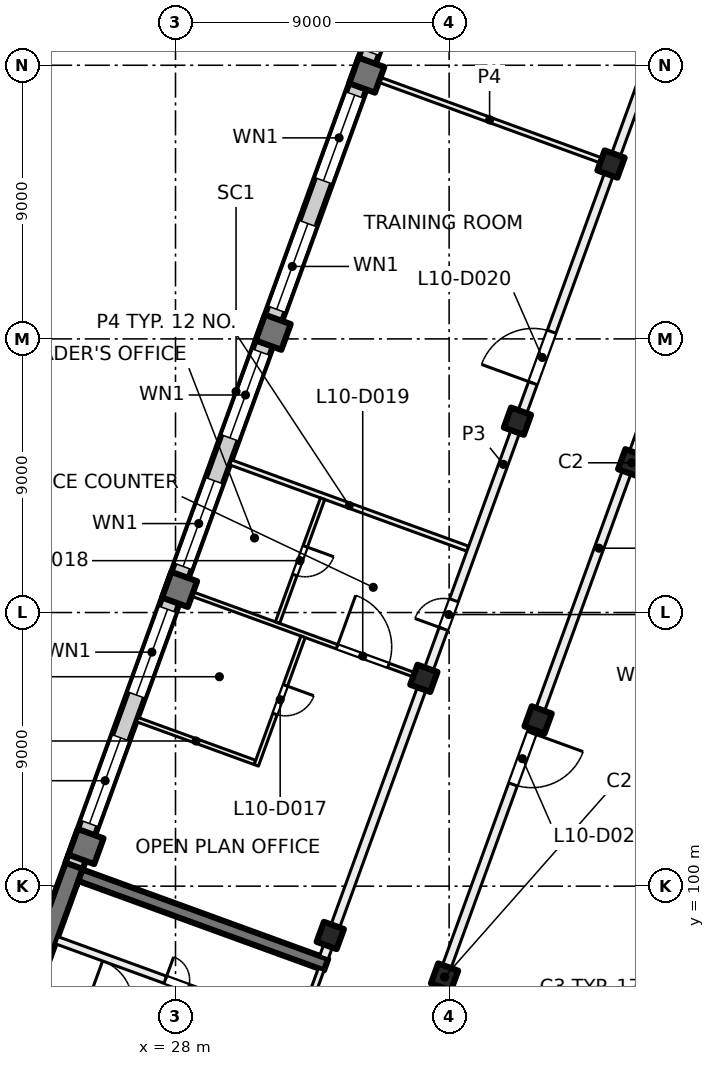
"""IFC4 building model, lengths in metres.
Left out: names, types, materials, properties, quantities, classifications, styles, units other than length and angle.
Written with IfcOpenShell. Run it as: python <this file> out.ifc"""

import sys

from ifc_helpers import new_model, si_unit, direction, frame, frame_2d, origin, origin_2d, place, context, subcontext, project, spatial, rectangle, extrude, element, fill, save


model = new_model("IFC4")
c1 = context("Model", 3, precision=1e-05, world=origin(), true_north=direction((0.0, 1.0)))
c2 = subcontext(c1, "Body", "Model", "MODEL_VIEW")
j1 = project(units=[si_unit("LENGTHUNIT", "METRE"), si_unit("PLANEANGLEUNIT", "RADIAN")], contexts=[c1])
p1 = place(None, origin())
s1 = spatial("IfcSite", under=j1, at=p1, CompositionType="ELEMENT")
p2 = place(p1, origin())
s2 = spatial("IfcBuilding", under=s1, at=p2, CompositionType="ELEMENT")
p3 = place(p2, frame((0.0, 0.0, 47.5)))
s3 = spatial("IfcBuildingStorey", under=s2, at=p3, CompositionType="ELEMENT", Elevation=47.5)
for number, where, z_axis, x_axis in (
    (1, (43.006, 113.925, 0.0), (0.0, 0.0, 1.0), (-0.342, -0.94, 0.0)),
    (2, (39.927, 105.468, 0.0), (0.0, 0.0, 1.0), (-0.342, -0.94, 0.0)),
    (3, (36.849, 97.011, 0.0), (0.0, 0.0, 1.0), (-0.342, -0.94, 0.0)),
    (4, (42.325, 123.751, 0.0), (0.0, 0.0, 1.0), (-0.342, -0.94, 0.0)),
    (5, (39.247, 115.293, 0.0), (0.0, 0.0, 1.0), (-0.342, -0.94, 0.0)),
    (6, (36.169, 106.836, 0.0), (0.0, 0.0, 1.0), (-0.342, -0.94, 0.0)),
    (7, (33.091, 98.379, 0.0), (0.0, 0.0, 1.0), (-0.342, -0.94, 0.0)),
):
    element("IfcColumn", number, at=place(p3, frame(where, z_axis=z_axis, x_axis=x_axis)), inside=s3, PredefinedType="COLUMN", context=c2, shape_type="SweptSolid", body=[
        extrude(rectangle(XDim=0.7, YDim=0.7, at=origin_2d()), origin(), (0.0, 0.0, 1.0), 4.0),
    ])
for number, where, z_axis, x_axis in (
    (8, (34.291, 126.675, 0.0), (0.0, 0.0, 1.0), (-0.342, -0.94, 0.0)),
    (9, (31.212, 118.218, 0.0), (0.0, 0.0, 1.0), (-0.342, -0.94, 0.0)),
    (10, (28.134, 109.76, 0.0), (0.0, 0.0, 1.0), (-0.342, -0.94, 0.0)),
    (11, (25.056, 101.303, 0.0), (0.0, 0.0, 1.0), (-0.342, -0.94, 0.0)),
):
    element("IfcColumn", number, at=place(p3, frame(where, z_axis=z_axis, x_axis=x_axis)), inside=s3, PredefinedType="COLUMN", context=c2, shape_type="SweptSolid", body=[
        extrude(rectangle(XDim=0.9, YDim=0.9, at=origin_2d()), origin(), (0.0, 0.0, 1.0), 4.0),
    ])
p4 = place(p3, frame((21.717, 92.568, 0.0), z_axis=(0.0, 0.0, 1.0), x_axis=(0.342016162452, 0.939694069696, 0.0)))
e12 = element("IfcWall", 12, at=p4, inside=s3, PredefinedType="SHEAR", context=c2, shape_type="SweptSolid", body=[
    extrude(rectangle(XDim=8.9, YDim=0.6, at=frame_2d((4.45, 0.0))), origin(), (0.0, 0.0, 1.0), 4.0),
])
p5 = place(p3, frame((32.953, 97.418, 0.0), z_axis=(0.0, 0.0, 1.0), x_axis=(-0.93969060187, 0.342025690201, 0.0)))
e13 = element("IfcWall", 13, at=p5, inside=s3, PredefinedType="SHEAR", context=c2, shape_type="SweptSolid", body=[
    extrude(rectangle(XDim=8.6, YDim=0.4, at=frame_2d((4.3, 0.0))), origin(), (0.0, 0.0, 1.0), 4.0),
])
p6 = place(p3, frame((24.666, 100.669, 0.0), z_axis=(0.0, 0.0, 1.0), x_axis=(0.34201964167, 0.939692803373, 0.0)))
e14 = element("IfcWall", 14, at=p6, inside=s3, PredefinedType="SOLIDWALL", context=c2, shape_type="SweptSolid", body=[
    extrude(rectangle(XDim=32.884, YDim=0.6, at=frame_2d((16.442, 0.0))), origin(), (0.0, 0.0, 1.0), 3.625),
])
p7 = place(p6, frame((1.48, 0.0, 0.9)))
e15 = element("IfcOpeningElement", 15, at=p7, cuts=e14, PredefinedType="OPENING", context=c2, shape_type="SweptSolid", body=[
    extrude(rectangle(XDim=3.0, YDim=2.4, at=frame_2d((1.5, 1.2))), frame((0.0, 0.31, 0.0), z_axis=(0.0, -1.0, 0.0), x_axis=(1.0, 0.0, 0.0)), (0.0, 0.0, 1.0), 0.62),
])
p8 = place(p6, frame((5.98, 0.0, 0.9)))
e16 = element("IfcOpeningElement", 16, at=p8, cuts=e14, PredefinedType="OPENING", context=c2, shape_type="SweptSolid", body=[
    extrude(rectangle(XDim=3.0, YDim=2.4, at=frame_2d((1.5, 1.2))), frame((0.0, 0.31, 0.0), z_axis=(0.0, -1.0, 0.0), x_axis=(1.0, 0.0, 0.0)), (0.0, 0.0, 1.0), 0.62),
])
p9 = place(p6, frame((10.48, 0.0, 0.9)))
e17 = element("IfcOpeningElement", 17, at=p9, cuts=e14, PredefinedType="OPENING", context=c2, shape_type="SweptSolid", body=[
    extrude(rectangle(XDim=3.0, YDim=2.4, at=frame_2d((1.5, 1.2))), frame((0.0, 0.31, 0.0), z_axis=(0.0, -1.0, 0.0), x_axis=(1.0, 0.0, 0.0)), (0.0, 0.0, 1.0), 0.62),
])
p10 = place(p6, frame((14.98, 0.0, 0.9)))
e18 = element("IfcOpeningElement", 18, at=p10, cuts=e14, PredefinedType="OPENING", context=c2, shape_type="SweptSolid", body=[
    extrude(rectangle(XDim=3.0, YDim=2.4, at=frame_2d((1.5, 1.2))), frame((0.0, 0.31, 0.0), z_axis=(0.0, -1.0, 0.0), x_axis=(1.0, 0.0, 0.0)), (0.0, 0.0, 1.0), 0.62),
])
p11 = place(p6, frame((19.48, 0.0, 0.9)))
e19 = element("IfcOpeningElement", 19, at=p11, cuts=e14, PredefinedType="OPENING", context=c2, shape_type="SweptSolid", body=[
    extrude(rectangle(XDim=3.0, YDim=2.4, at=frame_2d((1.5, 1.2))), frame((0.0, 0.31, 0.0), z_axis=(0.0, -1.0, 0.0), x_axis=(1.0, 0.0, 0.0)), (0.0, 0.0, 1.0), 0.62),
])
p12 = place(p6, frame((23.98, 0.0, 0.9)))
e20 = element("IfcOpeningElement", 20, at=p12, cuts=e14, PredefinedType="OPENING", context=c2, shape_type="SweptSolid", body=[
    extrude(rectangle(XDim=3.0, YDim=2.4, at=frame_2d((1.5, 1.2))), frame((0.0, 0.31, 0.0), z_axis=(0.0, -1.0, 0.0), x_axis=(1.0, 0.0, 0.0)), (0.0, 0.0, 1.0), 0.62),
])
p13 = place(p6, frame((28.48, 0.0, 0.9)))
e21 = element("IfcOpeningElement", 21, at=p13, cuts=e14, PredefinedType="OPENING", context=c2, shape_type="SweptSolid", body=[
    extrude(rectangle(XDim=3.0, YDim=2.4, at=frame_2d((1.5, 1.2))), frame((0.0, 0.31, 0.0), z_axis=(0.0, -1.0, 0.0), x_axis=(1.0, 0.0, 0.0)), (0.0, 0.0, 1.0), 0.62),
])
p14 = place(p3, frame((31.491, 93.693, 0.0), z_axis=(0.0, 0.0, 1.0), x_axis=(0.341995824804, 0.939701471648, 0.0)))
e22 = element("IfcWall", 22, at=p14, inside=s3, PredefinedType="PARTITIONING", context=c2, shape_type="SweptSolid", body=[
    extrude(rectangle(XDim=3.8, YDim=0.2, at=frame_2d((1.9, 0.0))), origin(), (0.0, 0.0, 1.0), 3.625),
])
p15 = place(p14, frame((0.3, 0.0, 0.0)))
e23 = element("IfcOpeningElement", 23, at=p15, cuts=e22, PredefinedType="OPENING", context=c2, shape_type="SweptSolid", body=[
    extrude(rectangle(XDim=1.2, YDim=2.1, at=frame_2d((0.6, 1.05))), frame((0.0, 0.11, 0.0), z_axis=(0.0, -1.0, 0.0), x_axis=(1.0, 0.0, 0.0)), (0.0, 0.0, 1.0), 0.22),
])
p16 = place(p3, frame((23.538, 96.694, 0.0), z_axis=(0.0, 0.0, 1.0), x_axis=(0.939691552312, -0.342023078919, 0.0)))
e24 = element("IfcWall", 24, at=p16, inside=s3, PredefinedType="PARTITIONING", context=c2, shape_type="SweptSolid", body=[
    extrude(rectangle(XDim=8.4, YDim=0.2, at=frame_2d((4.2, 0.0))), origin(), (0.0, 0.0, 1.0), 3.625),
])
p17 = place(p16, frame((1.65, 0.0, 0.0)))
e25 = element("IfcOpeningElement", 25, at=p17, cuts=e24, PredefinedType="OPENING", context=c2, shape_type="SweptSolid", body=[
    extrude(rectangle(XDim=1.5, YDim=2.1, at=frame_2d((0.75, 1.05))), frame((0.0, 0.11, 0.0), z_axis=(0.0, -1.0, 0.0), x_axis=(1.0, 0.0, 0.0)), (0.0, 0.0, 1.0), 0.22),
])
p18 = place(p3, frame((24.094, 98.221, 0.0), z_axis=(0.0, 0.0, 1.0), x_axis=(0.939691552312, -0.342023078919, 0.0)))
e26 = element("IfcWall", 26, at=p18, inside=s3, PredefinedType="PARTITIONING", context=c2, shape_type="SweptSolid", body=[
    extrude(rectangle(XDim=8.4, YDim=0.25, at=frame_2d((4.2, 0.0))), origin(), (0.0, 0.0, 1.0), 3.625),
])
p19 = place(p18, frame((3.8, 0.0, 0.0)))
e27 = element("IfcOpeningElement", 27, at=p19, cuts=e26, PredefinedType="OPENING", context=c2, shape_type="SweptSolid", body=[
    extrude(rectangle(XDim=0.8, YDim=2.1, at=frame_2d((0.4, 1.05))), frame((0.0, 0.135, 0.0), z_axis=(0.0, -1.0, 0.0), x_axis=(1.0, 0.0, 0.0)), (0.0, 0.0, 1.0), 0.27),
])
p20 = place(p3, frame((26.736, 105.48, 0.0), z_axis=(0.0, 0.0, 1.0), x_axis=(0.939784783713, -0.341766821533, 0.0)))
e28 = element("IfcWall", 28, at=p20, inside=s3, PredefinedType="PARTITIONING", context=c2, shape_type="SweptSolid", body=[
    extrude(rectangle(XDim=4.125, YDim=0.15, at=frame_2d((2.062, 0.0))), origin(), (0.0, 0.0, 1.0), 3.625),
])
p21 = place(p3, frame((28.275, 109.709, 0.0), z_axis=(0.0, 0.0, 1.0), x_axis=(0.939697205528, -0.342007546586, 0.0)))
e29 = element("IfcWall", 29, at=p21, inside=s3, PredefinedType="PARTITIONING", context=c2, shape_type="SweptSolid", body=[
    extrude(rectangle(XDim=8.301, YDim=0.15, at=frame_2d((4.15, 0.0))), origin(), (0.0, 0.0, 1.0), 3.625),
])
p22 = place(p21, frame((5.361, 0.0, 0.0)))
e30 = element("IfcOpeningElement", 30, at=p22, cuts=e29, PredefinedType="OPENING", context=c2, shape_type="SweptSolid", body=[
    extrude(rectangle(XDim=1.8, YDim=2.1, at=frame_2d((0.9, 1.05))), frame((0.0, 0.085, 0.0), z_axis=(0.0, -1.0, 0.0), x_axis=(1.0, 0.0, 0.0)), (0.0, 0.0, 1.0), 0.17),
])
p23 = place(p3, frame((29.814, 113.938, 0.0), z_axis=(0.0, 0.0, 1.0), x_axis=(0.939697205528, -0.342007546586, 0.0)))
e31 = element("IfcWall", 31, at=p23, inside=s3, PredefinedType="PARTITIONING", context=c2, shape_type="SweptSolid", body=[
    extrude(rectangle(XDim=8.301, YDim=0.175, at=frame_2d((4.15, 0.0))), origin(), (0.0, 0.0, 1.0), 3.625),
])
p24 = place(p3, frame((32.196, 108.203, 0.0), z_axis=(0.0, 0.0, 1.0), x_axis=(-0.34200440972, -0.939698347201, 0.0)))
e32 = element("IfcWall", 32, at=p24, inside=s3, PredefinedType="PARTITIONING", context=c2, shape_type="SweptSolid", body=[
    extrude(rectangle(XDim=4.5, YDim=0.15, at=frame_2d((2.25, 0.0))), origin(), (0.0, 0.0, 1.0), 3.625),
])
p25 = place(p24, frame((1.703, 0.0, 0.0)))
e33 = element("IfcOpeningElement", 33, at=p25, cuts=e32, PredefinedType="OPENING", context=c2, shape_type="SweptSolid", body=[
    extrude(rectangle(XDim=1.0, YDim=2.1, at=frame_2d((0.5, 1.05))), frame((0.0, 0.085, 0.0), z_axis=(0.0, -1.0, 0.0), x_axis=(1.0, 0.0, 0.0)), (0.0, 0.0, 1.0), 0.17),
])
p26 = place(p3, frame((32.838, 112.744, 0.0), z_axis=(0.0, 0.0, 1.0), x_axis=(-0.341896722183, -0.93973753323, 0.0)))
e34 = element("IfcWall", 34, at=p26, inside=s3, PredefinedType="PARTITIONING", context=c2, shape_type="SweptSolid", body=[
    extrude(rectangle(XDim=4.337, YDim=0.15, at=frame_2d((2.169, 0.0))), origin(), (0.0, 0.0, 1.0), 3.625),
])
p27 = place(p26, frame((1.669, 0.0, 0.0)))
e35 = element("IfcOpeningElement", 35, at=p27, cuts=e34, PredefinedType="OPENING", context=c2, shape_type="SweptSolid", body=[
    extrude(rectangle(XDim=1.0, YDim=2.1, at=frame_2d((0.5, 1.05))), frame((0.0, 0.085, 0.0), z_axis=(0.0, -1.0, 0.0), x_axis=(1.0, 0.0, 0.0)), (0.0, 0.0, 1.0), 0.17),
])
p28 = place(p3, frame((32.881, 97.657, 0.0), z_axis=(0.0, 0.0, 1.0), x_axis=(0.342017360004, 0.939693633828, 0.0)))
e36 = element("IfcWall", 36, at=p28, inside=s3, PredefinedType="PARTITIONING", context=c2, shape_type="SweptSolid", body=[
    extrude(rectangle(XDim=34.516, YDim=0.3, at=frame_2d((17.258, 0.0))), origin(), (0.0, 0.0, 1.0), 3.625),
])
p29 = place(p28, frame((11.5, 0.0, 0.0)))
e37 = element("IfcOpeningElement", 37, at=p29, cuts=e36, PredefinedType="OPENING", context=c2, shape_type="SweptSolid", body=[
    extrude(rectangle(XDim=1.0, YDim=2.1, at=frame_2d((0.5, 1.05))), frame((0.0, 0.16, 0.0), z_axis=(0.0, -1.0, 0.0), x_axis=(1.0, 0.0, 0.0)), (0.0, 0.0, 1.0), 0.32),
])
p30 = place(p28, frame((20.1, 0.0, 0.0)))
e38 = element("IfcOpeningElement", 38, at=p30, cuts=e36, PredefinedType="OPENING", context=c2, shape_type="SweptSolid", body=[
    extrude(rectangle(XDim=1.8, YDim=2.1, at=frame_2d((0.9, 1.05))), frame((0.0, 0.16, 0.0), z_axis=(0.0, -1.0, 0.0), x_axis=(1.0, 0.0, 0.0)), (0.0, 0.0, 1.0), 0.32),
])
p31 = place(p3, frame((42.231, 123.785, 0.0), z_axis=(0.0, 0.0, 1.0), x_axis=(-0.939687752599, 0.342033518263, 0.0)))
e39 = element("IfcWall", 39, at=p31, inside=s3, PredefinedType="PARTITIONING", context=c2, shape_type="SweptSolid", body=[
    extrude(rectangle(XDim=8.301, YDim=0.175, at=frame_2d((4.15, 0.0))), origin(), (0.0, 0.0, 1.0), 3.625),
])
p32 = place(p3, frame((43.1, 113.891, 0.0), z_axis=(0.0, 0.0, 1.0), x_axis=(0.939670544866, -0.342080790328, 0.0)))
e40 = element("IfcWall", 40, at=p32, inside=s3, PredefinedType="PARTITIONING", context=c2, shape_type="SweptSolid", body=[
    extrude(rectangle(XDim=8.3, YDim=0.15, at=frame_2d((4.15, 0.0))), origin(), (0.0, 0.0, 1.0), 3.625),
])
p33 = place(p3, frame((47.314, 125.909, 0.0), z_axis=(0.0, 0.0, 1.0), x_axis=(-0.342010770371, -0.939696032209, 0.0)))
e41 = element("IfcWall", 41, at=p33, inside=s3, PredefinedType="PARTITIONING", context=c2, shape_type="SweptSolid", body=[
    extrude(rectangle(XDim=31.485, YDim=0.3, at=frame_2d((15.742, 0.0))), origin(), (0.0, 0.0, 1.0), 3.625),
])
p34 = place(p33, frame((22.21, 0.0, 0.0)))
e42 = element("IfcOpeningElement", 42, at=p34, cuts=e41, PredefinedType="OPENING", context=c2, shape_type="SweptSolid", body=[
    extrude(rectangle(XDim=1.8, YDim=2.1, at=frame_2d((0.9, 1.05))), frame((0.0, 0.16, 0.0), z_axis=(0.0, -1.0, 0.0), x_axis=(1.0, 0.0, 0.0)), (0.0, 0.0, 1.0), 0.32),
])
p35 = place(p33, frame((9.985, 0.0, 0.0)))
e43 = element("IfcOpeningElement", 43, at=p35, cuts=e41, PredefinedType="OPENING", context=c2, shape_type="SweptSolid", body=[
    extrude(rectangle(XDim=1.0, YDim=2.1, at=frame_2d((0.5, 1.05))), frame((0.0, 0.16, 0.0), z_axis=(0.0, -1.0, 0.0), x_axis=(1.0, 0.0, 0.0)), (0.0, 0.0, 1.0), 0.32),
])
p36 = place(p33, frame((5.484, 0.0, 0.0)))
e44 = element("IfcOpeningElement", 44, at=p36, cuts=e41, PredefinedType="OPENING", context=c2, shape_type="SweptSolid", body=[
    extrude(rectangle(XDim=1.0, YDim=2.1, at=frame_2d((0.5, 1.05))), frame((0.0, 0.16, 0.0), z_axis=(0.0, -1.0, 0.0), x_axis=(1.0, 0.0, 0.0)), (0.0, 0.0, 1.0), 0.32),
])
p37 = place(p7, origin())
e45 = element("IfcWindow", 45, at=p37, inside=s3, PartitioningType="SINGLE_PANEL", PredefinedType="WINDOW", context=c2, shape_type="SweptSolid", body=[
    extrude(rectangle(XDim=3.0, YDim=2.4, at=frame_2d((1.5, 1.2))), frame((0.0, 0.03, 0.0), z_axis=(0.0, -1.0, 0.0), x_axis=(1.0, 0.0, 0.0)), (0.0, 0.0, 1.0), 0.06),
])
fill(e15, e45)
p38 = place(p8, origin())
e46 = element("IfcWindow", 46, at=p38, inside=s3, PartitioningType="SINGLE_PANEL", PredefinedType="WINDOW", context=c2, shape_type="SweptSolid", body=[
    extrude(rectangle(XDim=3.0, YDim=2.4, at=frame_2d((1.5, 1.2))), frame((0.0, 0.03, 0.0), z_axis=(0.0, -1.0, 0.0), x_axis=(1.0, 0.0, 0.0)), (0.0, 0.0, 1.0), 0.06),
])
fill(e16, e46)
p39 = place(p9, origin())
e47 = element("IfcWindow", 47, at=p39, inside=s3, PartitioningType="SINGLE_PANEL", PredefinedType="WINDOW", context=c2, shape_type="SweptSolid", body=[
    extrude(rectangle(XDim=3.0, YDim=2.4, at=frame_2d((1.5, 1.2))), frame((0.0, 0.03, 0.0), z_axis=(0.0, -1.0, 0.0), x_axis=(1.0, 0.0, 0.0)), (0.0, 0.0, 1.0), 0.06),
])
fill(e17, e47)
p40 = place(p10, origin())
e48 = element("IfcWindow", 48, at=p40, inside=s3, PartitioningType="SINGLE_PANEL", PredefinedType="WINDOW", context=c2, shape_type="SweptSolid", body=[
    extrude(rectangle(XDim=3.0, YDim=2.4, at=frame_2d((1.5, 1.2))), frame((0.0, 0.03, 0.0), z_axis=(0.0, -1.0, 0.0), x_axis=(1.0, 0.0, 0.0)), (0.0, 0.0, 1.0), 0.06),
])
fill(e18, e48)
p41 = place(p11, origin())
e49 = element("IfcWindow", 49, at=p41, inside=s3, PartitioningType="SINGLE_PANEL", PredefinedType="WINDOW", context=c2, shape_type="SweptSolid", body=[
    extrude(rectangle(XDim=3.0, YDim=2.4, at=frame_2d((1.5, 1.2))), frame((0.0, 0.03, 0.0), z_axis=(0.0, -1.0, 0.0), x_axis=(1.0, 0.0, 0.0)), (0.0, 0.0, 1.0), 0.06),
])
fill(e19, e49)
p42 = place(p12, origin())
e50 = element("IfcWindow", 50, at=p42, inside=s3, PartitioningType="SINGLE_PANEL", PredefinedType="WINDOW", context=c2, shape_type="SweptSolid", body=[
    extrude(rectangle(XDim=3.0, YDim=2.4, at=frame_2d((1.5, 1.2))), frame((0.0, 0.03, 0.0), z_axis=(0.0, -1.0, 0.0), x_axis=(1.0, 0.0, 0.0)), (0.0, 0.0, 1.0), 0.06),
])
fill(e20, e50)
p43 = place(p13, origin())
e51 = element("IfcWindow", 51, at=p43, inside=s3, PartitioningType="SINGLE_PANEL", PredefinedType="WINDOW", context=c2, shape_type="SweptSolid", body=[
    extrude(rectangle(XDim=3.0, YDim=2.4, at=frame_2d((1.5, 1.2))), frame((0.0, 0.03, 0.0), z_axis=(0.0, -1.0, 0.0), x_axis=(1.0, 0.0, 0.0)), (0.0, 0.0, 1.0), 0.06),
])
fill(e21, e51)
p44 = place(p19, origin())
e52 = element("IfcDoor", 52, at=p44, inside=s3, OperationType="SINGLE_SWING_LEFT", PredefinedType="DOOR", context=c2, shape_type="SweptSolid", body=[
    extrude(rectangle(XDim=0.8, YDim=2.1, at=frame_2d((0.4, 1.05))), frame((0.0, 0.025, 0.0), z_axis=(0.0, -1.0, 0.0), x_axis=(1.0, 0.0, 0.0)), (0.0, 0.0, 1.0), 0.05),
])
fill(e27, e52)
p45 = place(p29, origin())
e53 = element("IfcDoor", 53, at=p45, inside=s3, OperationType="SINGLE_SWING_LEFT", PredefinedType="DOOR", context=c2, shape_type="SweptSolid", body=[
    extrude(rectangle(XDim=1.0, YDim=2.1, at=frame_2d((0.5, 1.05))), frame((0.0, 0.025, 0.0), z_axis=(0.0, -1.0, 0.0), x_axis=(1.0, 0.0, 0.0)), (0.0, 0.0, 1.0), 0.05),
])
fill(e37, e53)
p46 = place(p25, origin())
e54 = element("IfcDoor", 54, at=p46, inside=s3, OperationType="SINGLE_SWING_LEFT", PredefinedType="DOOR", context=c2, shape_type="SweptSolid", body=[
    extrude(rectangle(XDim=1.0, YDim=2.1, at=frame_2d((0.5, 1.05))), frame((0.0, 0.025, 0.0), z_axis=(0.0, -1.0, 0.0), x_axis=(1.0, 0.0, 0.0)), (0.0, 0.0, 1.0), 0.05),
])
fill(e33, e54)
p47 = place(p27, origin())
e55 = element("IfcDoor", 55, at=p47, inside=s3, OperationType="SINGLE_SWING_LEFT", PredefinedType="DOOR", context=c2, shape_type="SweptSolid", body=[
    extrude(rectangle(XDim=1.0, YDim=2.1, at=frame_2d((0.5, 1.05))), frame((0.0, 0.025, 0.0), z_axis=(0.0, -1.0, 0.0), x_axis=(1.0, 0.0, 0.0)), (0.0, 0.0, 1.0), 0.05),
])
fill(e35, e55)
p48 = place(p22, origin())
e56 = element("IfcDoor", 56, at=p48, inside=s3, OperationType="DOUBLE_DOOR_SINGLE_SWING", PredefinedType="DOOR", context=c2, shape_type="SweptSolid", body=[
    extrude(rectangle(XDim=1.8, YDim=2.1, at=frame_2d((0.9, 1.05))), frame((0.0, 0.025, 0.0), z_axis=(0.0, -1.0, 0.0), x_axis=(1.0, 0.0, 0.0)), (0.0, 0.0, 1.0), 0.05),
])
fill(e30, e56)
p49 = place(p30, origin())
e57 = element("IfcDoor", 57, at=p49, inside=s3, OperationType="DOUBLE_DOOR_SINGLE_SWING", PredefinedType="DOOR", context=c2, shape_type="SweptSolid", body=[
    extrude(rectangle(XDim=1.8, YDim=2.1, at=frame_2d((0.9, 1.05))), frame((0.0, 0.025, 0.0), z_axis=(0.0, -1.0, 0.0), x_axis=(1.0, 0.0, 0.0)), (0.0, 0.0, 1.0), 0.05),
])
fill(e38, e57)
p50 = place(p34, origin())
e58 = element("IfcDoor", 58, at=p50, inside=s3, OperationType="DOUBLE_DOOR_SINGLE_SWING", PredefinedType="DOOR", context=c2, shape_type="SweptSolid", body=[
    extrude(rectangle(XDim=1.8, YDim=2.1, at=frame_2d((0.9, 1.05))), frame((0.0, 0.025, 0.0), z_axis=(0.0, -1.0, 0.0), x_axis=(1.0, 0.0, 0.0)), (0.0, 0.0, 1.0), 0.05),
])
fill(e42, e58)
save(model, sys.argv[1])
